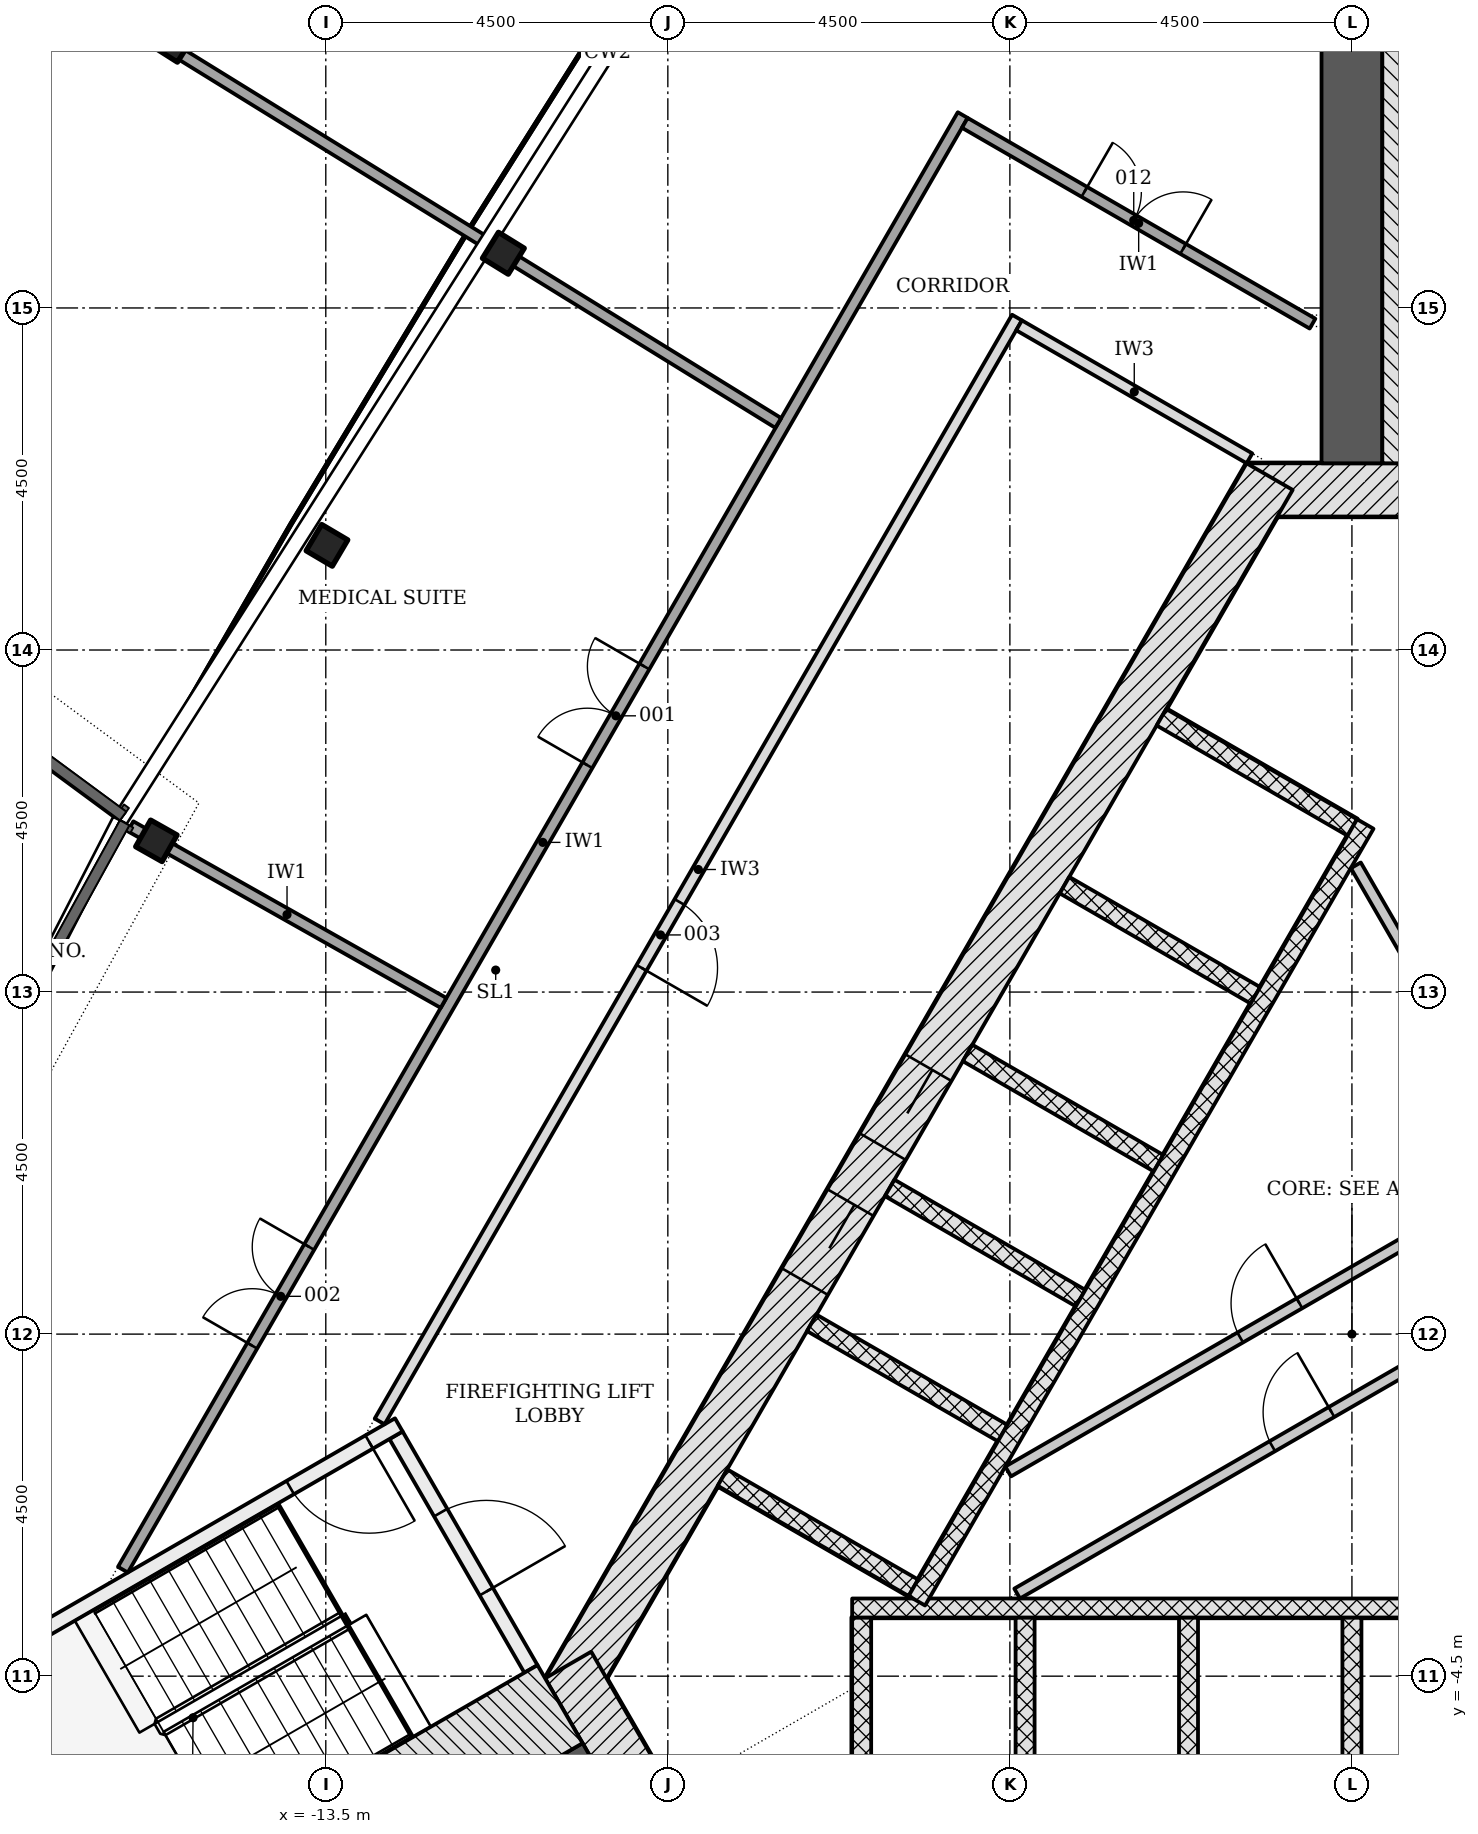
"""IFC4 building model, lengths in metres.
Left out: names, types, materials, properties, quantities, classifications, styles, units other than length and angle.
Written with IfcOpenShell. Run it as: python <this file> out.ifc"""

import sys

from ifc_helpers import new_model, si_unit, direction, frame, frame_2d, origin, origin_2d, place, context, subcontext, project, spatial, polyline, rectangle, hollow_rectangle, i_section, outline, extrude, element, fill, save


model = new_model("IFC4")
c1 = context("Model", 3, precision=1e-05, world=origin(), true_north=direction((0.0, 1.0)))
c2 = subcontext(c1, "Body", "Model", "MODEL_VIEW")
j1 = project(units=[si_unit("LENGTHUNIT", "METRE"), si_unit("PLANEANGLEUNIT", "RADIAN")], contexts=[c1])
p1 = place(None, origin())
s1 = spatial("IfcSite", under=j1, at=p1, CompositionType="ELEMENT")
p2 = place(p1, origin())
s2 = spatial("IfcBuilding", under=s1, at=p2, CompositionType="ELEMENT")
p3 = place(p2, frame((0.0, 0.0, 91.5)))
s3 = spatial("IfcBuildingStorey", under=s2, at=p3, CompositionType="ELEMENT", Elevation=91.5)
p4 = place(p3, frame((1.386, 11.106, -0.2), z_axis=(0.0, 0.0, 1.0), x_axis=(-1.0, 0.0, 0.0)))
e1 = element("IfcWall", 1, at=p4, inside=s3, PredefinedType="SHEAR", context=c2, shape_type="SweptSolid", body=[
    extrude(rectangle(XDim=2.771, YDim=0.7, at=frame_2d((1.386, 0.0))), origin(), (0.0, 0.0, 1.0), 3.6),
])
p5 = place(p3, frame((-1.083, 11.281, -0.2), z_axis=(0.0, 0.0, 1.0), x_axis=(-0.500001446645, -0.866024568562, 0.0)))
e2 = element("IfcWall", 2, at=p5, inside=s3, PredefinedType="SHEAR", context=c2, shape_type="SweptSolid", body=[
    extrude(rectangle(XDim=18.458, YDim=0.7, at=frame_2d((9.229, 0.0))), origin(), (0.0, 0.0, 1.0), 3.6),
])
p6 = place(p5, frame((8.979, 0.0, 0.2)))
e3 = element("IfcOpeningElement", 3, at=p6, cuts=e2, PredefinedType="OPENING", context=c2, shape_type="SweptSolid", body=[
    extrude(rectangle(XDim=1.2, YDim=2.1, at=frame_2d((0.6, 1.05))), frame((0.0, 0.36, 0.0), z_axis=(0.0, -1.0, 0.0), x_axis=(1.0, 0.0, 0.0)), (0.0, 0.0, 1.0), 0.72),
])
p7 = place(p5, frame((11.029, 0.0, 0.2)))
e4 = element("IfcOpeningElement", 4, at=p7, cuts=e2, PredefinedType="OPENING", context=c2, shape_type="SweptSolid", body=[
    extrude(rectangle(XDim=1.2, YDim=2.1, at=frame_2d((0.6, 1.05))), frame((0.0, 0.36, 0.0), z_axis=(0.0, -1.0, 0.0), x_axis=(1.0, 0.0, 0.0)), (0.0, 0.0, 1.0), 0.72),
])
p8 = place(p3, frame((-10.311, -4.353, -0.2), z_axis=(0.0, 0.0, 1.0), x_axis=(0.500042739161, -0.866000726912, 0.0)))
e5 = element("IfcWall", 5, at=p8, inside=s3, PredefinedType="SHEAR", context=c2, shape_type="SweptSolid", body=[
    extrude(rectangle(XDim=2.771, YDim=0.7, at=frame_2d((1.386, 0.0))), origin(), (0.0, 0.0, 1.0), 3.6),
])
p9 = place(p3, frame((0.0, 11.456, -0.2), z_axis=(0.0, 0.0, 1.0), x_axis=(0.0, 1.0, 0.0)))
e6 = element("IfcWall", 6, at=p9, inside=s3, PredefinedType="SHEAR", context=c2, shape_type="SweptSolid", body=[
    extrude(rectangle(XDim=12.678, YDim=0.8, at=frame_2d((6.339, 0.0))), origin(), (0.0, 0.0, 1.0), 3.6),
])
p10 = place(p3, frame((-9.922, -5.728, -0.2), z_axis=(0.0, 0.0, 1.0), x_axis=(-0.866029086277, -0.499993621681, 0.0)))
e7 = element("IfcWall", 7, at=p10, inside=s3, PredefinedType="SHEAR", context=c2, shape_type="SweptSolid", body=[
    extrude(rectangle(XDim=12.677, YDim=0.8, at=frame_2d((6.339, 0.0))), origin(), (0.0, 0.0, 1.0), 3.6),
])
for number, where, z_axis, x_axis in (
    (8, (-11.164, 14.22, -0.2), (0.0, 0.0, 1.0), (-0.525, -0.851, 0.0)),
    (9, (-13.484, 10.377, -0.2), (0.0, 0.0, 1.0), (-0.508, -0.861, 0.0)),
    (10, (-15.729, 6.49, -0.2), (0.0, 0.0, 1.0), (-0.491, -0.871, 0.0)),
):
    element("IfcColumn", number, at=place(p3, frame(where, z_axis=z_axis, x_axis=x_axis)), inside=s3, PredefinedType="COLUMN", context=c2, shape_type="SweptSolid", body=[
        extrude(i_section(OverallWidth=0.401, OverallDepth=0.399, WebThickness=0.025, FlangeThickness=0.04, FilletRadius=0.015, at=origin_2d()), origin(), (0.0, 0.0, 1.0), 3.6),
    ])
p11 = place(p3, frame((-15.507, 16.98, -0.2), z_axis=(0.0, 0.0, 1.0), x_axis=(-0.843995500683, 0.536350253871, 0.0)))
e11 = element("IfcColumn", 11, at=p11, inside=s3, PredefinedType="COLUMN", context=c2, shape_type="SweptSolid", body=[
    extrude(hollow_rectangle(XDim=0.356, YDim=0.356, WallThickness=0.013, at=origin_2d()), origin(), (0.0, 0.0, 1.0), 3.6),
])
for number, where, z_axis, x_axis in (
    (12, (-6.45, -6.228, -0.2), (0.0, 0.0, 1.0), (0.0, 1.0, 0.0)),
    (13, (-4.3, -6.228, -0.2), (0.0, 0.0, 1.0), (0.0, 1.0, 0.0)),
    (14, (-2.15, -6.228, -0.2), (0.0, 0.0, 1.0), (0.0, 1.0, 0.0)),
    (15, (0.0, -6.228, -0.2), (0.0, 0.0, 1.0), (0.0, 1.0, 0.0)),
):
    element("IfcWall", number, at=place(p3, frame(where, z_axis=z_axis, x_axis=x_axis)), inside=s3, PredefinedType="PARTITIONING", context=c2, shape_type="SweptSolid", body=[
        extrude(rectangle(XDim=2.5, YDim=0.25, at=frame_2d((1.25, 0.0))), origin(), (0.0, 0.0, 1.0), 3.6),
    ])
p12 = place(p3, frame((-6.575, -3.603, 0.0), z_axis=(0.0, 0.0, 1.0), x_axis=(1.0, 0.0, 0.0)))
e16 = element("IfcWall", 16, at=p12, inside=s3, PredefinedType="PARTITIONING", context=c2, shape_type="SweptSolid", body=[
    extrude(rectangle(XDim=13.15, YDim=0.25, at=frame_2d((6.575, 0.0))), origin(), (0.0, 0.0, 1.0), 3.4),
])
p13 = place(p3, frame((-2.506, 8.115, -0.2), z_axis=(0.0, 0.0, 1.0), x_axis=(0.865996321171, -0.50005036918, 0.0)))
e17 = element("IfcWall", 17, at=p13, inside=s3, PredefinedType="PARTITIONING", context=c2, shape_type="SweptSolid", body=[
    extrude(rectangle(XDim=2.9, YDim=0.25, at=frame_2d((1.45, 0.0))), origin(), (0.0, 0.0, 1.0), 3.6),
])
for number, where, z_axis, x_axis in (
    (18, (-3.781, 5.907, -0.2), (0.0, 0.0, 1.0), (0.866, -0.5, 0.0)),
    (19, (-5.056, 3.699, -0.2), (0.0, 0.0, 1.0), (0.866, -0.5, 0.0)),
    (20, (-6.081, 1.923, -0.2), (0.0, 0.0, 1.0), (0.866, -0.5, 0.0)),
    (21, (-7.106, 0.148, -0.2), (0.0, 0.0, 1.0), (0.866, -0.5, 0.0)),
    (22, (-8.281, -1.887, -0.2), (0.0, 0.0, 1.0), (0.866, -0.5, 0.0)),
):
    element("IfcWall", number, at=place(p3, frame(where, z_axis=z_axis, x_axis=x_axis)), inside=s3, PredefinedType="PARTITIONING", context=c2, shape_type="SweptSolid", body=[
        extrude(rectangle(XDim=2.9, YDim=0.25, at=frame_2d((1.45, 0.0))), origin(), (0.0, 0.0, 1.0), 3.6),
    ])
p14 = place(p3, frame((0.176, 6.711, 0.0), z_axis=(0.0, 0.0, 1.0), x_axis=(-0.500004227369, -0.866022963098, 0.0)))
e23 = element("IfcWall", 23, at=p14, inside=s3, PredefinedType="PARTITIONING", context=c2, shape_type="SweptSolid", body=[
    extrude(rectangle(XDim=11.8, YDim=0.25, at=frame_2d((5.9, 0.0))), origin(), (0.0, 0.0, 1.0), 3.4),
])
p15 = place(p3, frame((-4.523, -1.807, 0.0), z_axis=(0.0, 0.0, 1.0), x_axis=(0.866030300338, 0.499991518824, 0.0)))
e24 = element("IfcWall", 24, at=p15, inside=s3, PredefinedType="PARTITIONING", context=c2, shape_type="SweptSolid", body=[
    extrude(rectangle(XDim=11.049, YDim=0.15, at=frame_2d((5.524, 0.0))), origin(), (0.0, 0.0, 1.0), 3.4),
])
p16 = place(p15, frame((3.525, 0.0, 0.0)))
e25 = element("IfcOpeningElement", 25, at=p16, cuts=e24, PredefinedType="OPENING", context=c2, shape_type="SweptSolid", body=[
    extrude(rectangle(XDim=0.9, YDim=2.1, at=frame_2d((0.45, 1.05))), frame((0.0, 0.085, 0.0), z_axis=(0.0, -1.0, 0.0), x_axis=(1.0, 0.0, 0.0)), (0.0, 0.0, 1.0), 0.17),
])
p17 = place(p3, frame((-4.404, -3.413, 0.0), z_axis=(0.0, 0.0, 1.0), x_axis=(0.866022252853, 0.500005457533, 0.0)))
e26 = element("IfcWall", 26, at=p17, inside=s3, PredefinedType="PARTITIONING", context=c2, shape_type="SweptSolid", body=[
    extrude(rectangle(XDim=11.749, YDim=0.15, at=frame_2d((5.875, 0.0))), origin(), (0.0, 0.0, 1.0), 3.4),
])
p18 = place(p17, frame((3.875, 0.0, 0.0)))
e27 = element("IfcOpeningElement", 27, at=p18, cuts=e26, PredefinedType="OPENING", context=c2, shape_type="SweptSolid", body=[
    extrude(rectangle(XDim=0.9, YDim=2.1, at=frame_2d((0.45, 1.05))), frame((0.0, 0.085, 0.0), z_axis=(0.0, -1.0, 0.0), x_axis=(1.0, 0.0, 0.0)), (0.0, 0.0, 1.0), 0.17),
])
p19 = place(p3, frame((2.174, 2.492, 0.0), z_axis=(0.0, 0.0, 1.0), x_axis=(-0.499999641798, 0.866025610592, 0.0)))
e28 = element("IfcWall", 28, at=p19, inside=s3, PredefinedType="PARTITIONING", context=c2, shape_type="SweptSolid", body=[
    extrude(rectangle(XDim=4.244, YDim=0.15, at=frame_2d((2.122, 0.0))), origin(), (0.0, 0.0, 1.0), 3.4),
])
p20 = place(p3, frame((0.993, 11.456, -0.2), z_axis=(0.0, 0.0, 1.0), x_axis=(0.0, 1.0, 0.0)))
e29 = element("IfcWall", 29, at=p20, inside=s3, PredefinedType="SHEAR", context=c2, shape_type="SweptSolid", body=[
    extrude(rectangle(XDim=7.2, YDim=1.186, at=frame_2d((3.6, 0.0))), origin(), (0.0, 0.0, 1.0), 3.6),
])
p21 = place(p3, frame((-12.576, -1.331, -0.2), z_axis=(0.0, 0.0, 1.0), x_axis=(0.499970499736, -0.8660424351, 0.0)))
e30 = element("IfcWall", 30, at=p21, inside=s3, PredefinedType="SHEAR", context=c2, shape_type="SweptSolid", body=[
    extrude(rectangle(XDim=3.55, YDim=0.2, at=frame_2d((1.775, 0.0))), origin(), (0.0, 0.0, 1.0), 3.6),
])
p22 = place(p21, frame((1.175, 0.0, 0.2)))
e31 = element("IfcOpeningElement", 31, at=p22, cuts=e30, PredefinedType="OPENING", context=c2, shape_type="SweptSolid", body=[
    extrude(rectangle(XDim=1.2, YDim=2.1, at=frame_2d((0.6, 1.05))), frame((0.0, 0.11, 0.0), z_axis=(0.0, -1.0, 0.0), x_axis=(1.0, 0.0, 0.0)), (0.0, 0.0, 1.0), 0.22),
])
p23 = place(p3, frame((-12.539, -1.194, -0.2), z_axis=(0.0, 0.0, 1.0), x_axis=(-0.866045472092, -0.499965239061, 0.0)))
e32 = element("IfcWall", 32, at=p23, inside=s3, PredefinedType="SHEAR", context=c2, shape_type="SweptSolid", body=[
    extrude(rectangle(XDim=5.6, YDim=0.2, at=frame_2d((2.8, 0.0))), origin(), (0.0, 0.0, 1.0), 3.6),
])
p24 = place(p23, frame((0.45, 0.0, 0.2)))
e33 = element("IfcOpeningElement", 33, at=p24, cuts=e32, PredefinedType="OPENING", context=c2, shape_type="SweptSolid", body=[
    extrude(rectangle(XDim=1.2, YDim=2.1, at=frame_2d((0.6, 1.05))), frame((0.0, 0.11, 0.0), z_axis=(0.0, -1.0, 0.0), x_axis=(1.0, 0.0, 0.0)), (0.0, 0.0, 1.0), 0.22),
])
p25 = place(p3, frame((-10.418, -4.868, -0.2), z_axis=(0.0, 0.0, 1.0), x_axis=(-0.866018442252, -0.500012057535, 0.0)))
e34 = element("IfcWall", 34, at=p25, inside=s3, PredefinedType="SHEAR", context=c2, shape_type="SweptSolid", body=[
    extrude(rectangle(XDim=7.2, YDim=1.186, at=frame_2d((3.6, 0.0))), origin(), (0.0, 0.0, 1.0), 3.6),
])
p26 = place(p3, frame((0.0, 0.0, -0.2)))
e35 = element("IfcWall", 35, at=p26, inside=s3, PredefinedType="SHEAR", context=c2, shape_type="SweptSolid", body=[
    extrude(outline(polyline([(-17.439, -3.907), (-18.025, -6.093), (-16.95, -7.955), (-16.777, -7.855), (-17.81, -6.065), (-17.267, -4.039), (-17.339, -4.081), (-17.339, -4.081), (-17.339, -4.081), (-17.339, -4.081), (-17.339, -4.081), (-17.339, -4.081), (-17.339, -4.081), (-17.339, -4.081), (-17.339, -4.081), (-17.339, -4.081), (-17.339, -4.081), (-17.339, -4.081), (-17.339, -4.081), (-17.339, -4.081), (-17.339, -4.081), (-17.339, -4.081), (-17.339, -4.081), (-17.439, -3.907)])), origin(), (0.0, 0.0, 1.0), 3.6),
])
p27 = place(p3, frame((-16.169, -3.099, 0.0), z_axis=(0.0, 0.0, 1.0), x_axis=(0.499999805269, 0.866025516212, 0.0)))
e36 = element("IfcWall", 36, at=p27, inside=s3, PredefinedType="PARTITIONING", context=c2, shape_type="SweptSolid", body=[
    extrude(rectangle(XDim=22.097, YDim=0.15, at=frame_2d((11.049, 0.0))), origin(), (0.0, 0.0, 1.0), 2.778),
])
p28 = place(p27, frame((12.221, 0.0, 0.0)))
e37 = element("IfcOpeningElement", 37, at=p28, cuts=e36, PredefinedType="OPENING", context=c2, shape_type="SweptSolid", body=[
    extrude(rectangle(XDim=1.5, YDim=2.1, at=frame_2d((0.75, 1.05))), frame((0.0, 0.085, 0.0), z_axis=(0.0, -1.0, 0.0), x_axis=(1.0, 0.0, 0.0)), (0.0, 0.0, 1.0), 0.17),
])
p29 = place(p27, frame((3.403, 0.0, 0.0)))
e38 = element("IfcOpeningElement", 38, at=p29, cuts=e36, PredefinedType="OPENING", context=c2, shape_type="SweptSolid", body=[
    extrude(rectangle(XDim=1.5, YDim=2.1, at=frame_2d((0.75, 1.05))), frame((0.0, 0.085, 0.0), z_axis=(0.0, -1.0, 0.0), x_axis=(1.0, 0.0, 0.0)), (0.0, 0.0, 1.0), 0.17),
])
p30 = place(p3, frame((-4.407, 13.374, 0.0), z_axis=(0.0, 0.0, 1.0), x_axis=(-0.499997181693, -0.866027030928, 0.0)))
e39 = element("IfcWall", 39, at=p30, inside=s3, PredefinedType="PARTITIONING", context=c2, shape_type="SweptSolid", body=[
    extrude(rectangle(XDim=16.77, YDim=0.15, at=frame_2d((8.385, 0.0))), origin(), (0.0, 0.0, 1.0), 2.778),
])
p31 = place(p30, frame((8.879, 0.0, 0.0)))
e40 = element("IfcOpeningElement", 40, at=p31, cuts=e39, PredefinedType="OPENING", context=c2, shape_type="SweptSolid", body=[
    extrude(rectangle(XDim=1.0, YDim=2.1, at=frame_2d((0.5, 1.05))), frame((0.0, 0.085, 0.0), z_axis=(0.0, -1.0, 0.0), x_axis=(1.0, 0.0, 0.0)), (0.0, 0.0, 1.0), 0.17),
])
p32 = place(p3, frame((-5.093, 15.935, 0.0), z_axis=(0.0, 0.0, 1.0), x_axis=(0.866033195618, -0.499986503906, 0.0)))
e41 = element("IfcWall", 41, at=p32, inside=s3, PredefinedType="PARTITIONING", context=c2, shape_type="SweptSolid", body=[
    extrude(rectangle(XDim=5.282, YDim=0.15, at=frame_2d((2.641, 0.0))), origin(), (0.0, 0.0, 1.0), 3.4),
])
p33 = place(p32, frame((1.816, 0.0, 0.0)))
e42 = element("IfcOpeningElement", 42, at=p33, cuts=e41, PredefinedType="OPENING", context=c2, shape_type="SweptSolid", body=[
    extrude(rectangle(XDim=1.5, YDim=2.1, at=frame_2d((0.75, 1.05))), frame((0.0, 0.085, 0.0), z_axis=(0.0, -1.0, 0.0), x_axis=(1.0, 0.0, 0.0)), (0.0, 0.0, 1.0), 0.17),
])
p34 = place(p3, frame((-4.379, 13.271, 0.0), z_axis=(0.0, 0.0, 1.0), x_axis=(0.866019471182, -0.500010275428, 0.0)))
e43 = element("IfcWall", 43, at=p34, inside=s3, PredefinedType="PARTITIONING", context=c2, shape_type="SweptSolid", body=[
    extrude(rectangle(XDim=3.5, YDim=0.15, at=frame_2d((1.75, 0.0))), origin(), (0.0, 0.0, 1.0), 3.4),
])
p35 = place(p3, frame((-24.361, 22.368, 0.0), z_axis=(0.0, 0.0, 1.0), x_axis=(0.850884423776, -0.525352926494, 0.0)))
e44 = element("IfcWall", 44, at=p35, inside=s3, PredefinedType="PARTITIONING", context=c2, shape_type="SweptSolid", body=[
    extrude(rectangle(XDim=19.759, YDim=0.15, at=frame_2d((9.879, 0.0))), origin(), (0.0, 0.0, 1.0), 2.778),
])
p36 = place(p3, frame((-16.069, 6.681, 0.0), z_axis=(0.0, 0.0, 1.0), x_axis=(0.87091272742, -0.49143770838, 0.0)))
e45 = element("IfcWall", 45, at=p36, inside=s3, PredefinedType="PARTITIONING", context=c2, shape_type="SweptSolid", body=[
    extrude(rectangle(XDim=4.728, YDim=0.15, at=frame_2d((2.364, 0.0))), origin(), (0.0, 0.0, 1.0), 2.778),
])
p37 = place(p6, origin())
e46 = element("IfcDoor", 46, at=p37, inside=s3, OperationType="DOUBLE_DOOR_SLIDING", PredefinedType="DOOR", context=c2, shape_type="SweptSolid", body=[
    extrude(rectangle(XDim=1.2, YDim=2.1, at=frame_2d((0.6, 1.05))), frame((0.0, 0.025, 0.0), z_axis=(0.0, -1.0, 0.0), x_axis=(1.0, 0.0, 0.0)), (0.0, 0.0, 1.0), 0.05),
])
fill(e3, e46)
p38 = place(p7, origin())
e47 = element("IfcDoor", 47, at=p38, inside=s3, OperationType="DOUBLE_DOOR_SLIDING", PredefinedType="DOOR", context=c2, shape_type="SweptSolid", body=[
    extrude(rectangle(XDim=1.2, YDim=2.1, at=frame_2d((0.6, 1.05))), frame((0.0, 0.025, 0.0), z_axis=(0.0, -1.0, 0.0), x_axis=(1.0, 0.0, 0.0)), (0.0, 0.0, 1.0), 0.05),
])
fill(e4, e47)
p39 = place(p18, origin())
e48 = element("IfcDoor", 48, at=p39, inside=s3, OperationType="SINGLE_SWING_RIGHT", PredefinedType="DOOR", context=c2, shape_type="SweptSolid", body=[
    extrude(rectangle(XDim=0.9, YDim=2.1, at=frame_2d((0.45, 1.05))), frame((0.0, 0.025, 0.0), z_axis=(0.0, -1.0, 0.0), x_axis=(1.0, 0.0, 0.0)), (0.0, 0.0, 1.0), 0.05),
])
fill(e27, e48)
p40 = place(p16, origin())
e49 = element("IfcDoor", 49, at=p40, inside=s3, OperationType="SINGLE_SWING_RIGHT", PredefinedType="DOOR", context=c2, shape_type="SweptSolid", body=[
    extrude(rectangle(XDim=0.9, YDim=2.1, at=frame_2d((0.45, 1.05))), frame((0.0, 0.025, 0.0), z_axis=(0.0, -1.0, 0.0), x_axis=(1.0, 0.0, 0.0)), (0.0, 0.0, 1.0), 0.05),
])
fill(e25, e49)
p41 = place(p22, origin())
e50 = element("IfcDoor", 50, at=p41, inside=s3, OperationType="SINGLE_SWING_RIGHT", PredefinedType="DOOR", context=c2, shape_type="SweptSolid", body=[
    extrude(rectangle(XDim=1.2, YDim=2.1, at=frame_2d((0.6, 1.05))), frame((0.0, 0.025, 0.0), z_axis=(0.0, -1.0, 0.0), x_axis=(1.0, 0.0, 0.0)), (0.0, 0.0, 1.0), 0.05),
])
fill(e31, e50)
p42 = place(p24, origin())
e51 = element("IfcDoor", 51, at=p42, inside=s3, OperationType="SINGLE_SWING_LEFT", PredefinedType="DOOR", context=c2, shape_type="SweptSolid", body=[
    extrude(rectangle(XDim=1.2, YDim=2.1, at=frame_2d((0.6, 1.05))), frame((0.0, 0.025, 0.0), z_axis=(0.0, -1.0, 0.0), x_axis=(1.0, 0.0, 0.0)), (0.0, 0.0, 1.0), 0.05),
])
fill(e33, e51)
p43 = place(p28, origin())
e52 = element("IfcDoor", 52, at=p43, inside=s3, OperationType="DOUBLE_DOOR_SINGLE_SWING", PredefinedType="DOOR", context=c2, shape_type="SweptSolid", body=[
    extrude(rectangle(XDim=1.5, YDim=2.1, at=frame_2d((0.75, 1.05))), frame((0.0, 0.025, 0.0), z_axis=(0.0, -1.0, 0.0), x_axis=(1.0, 0.0, 0.0)), (0.0, 0.0, 1.0), 0.05),
])
fill(e37, e52)
p44 = place(p29, origin())
e53 = element("IfcDoor", 53, at=p44, inside=s3, OperationType="DOUBLE_DOOR_SINGLE_SWING", PredefinedType="DOOR", context=c2, shape_type="SweptSolid", body=[
    extrude(rectangle(XDim=1.5, YDim=2.1, at=frame_2d((0.75, 1.05))), frame((0.0, 0.025, 0.0), z_axis=(0.0, -1.0, 0.0), x_axis=(1.0, 0.0, 0.0)), (0.0, 0.0, 1.0), 0.05),
])
fill(e38, e53)
p45 = place(p31, origin())
e54 = element("IfcDoor", 54, at=p45, inside=s3, OperationType="SINGLE_SWING_RIGHT", PredefinedType="DOOR", context=c2, shape_type="SweptSolid", body=[
    extrude(rectangle(XDim=1.0, YDim=2.1, at=frame_2d((0.5, 1.05))), frame((0.0, 0.025, 0.0), z_axis=(0.0, -1.0, 0.0), x_axis=(1.0, 0.0, 0.0)), (0.0, 0.0, 1.0), 0.05),
])
fill(e40, e54)
p46 = place(p33, origin())
e55 = element("IfcDoor", 55, at=p46, inside=s3, OperationType="DOUBLE_DOOR_SINGLE_SWING", PredefinedType="DOOR", context=c2, shape_type="SweptSolid", body=[
    extrude(rectangle(XDim=1.5, YDim=2.1, at=frame_2d((0.75, 1.05))), frame((0.0, 0.025, 0.0), z_axis=(0.0, -1.0, 0.0), x_axis=(1.0, 0.0, 0.0)), (0.0, 0.0, 1.0), 0.05),
])
fill(e42, e55)
save(model, sys.argv[1])
